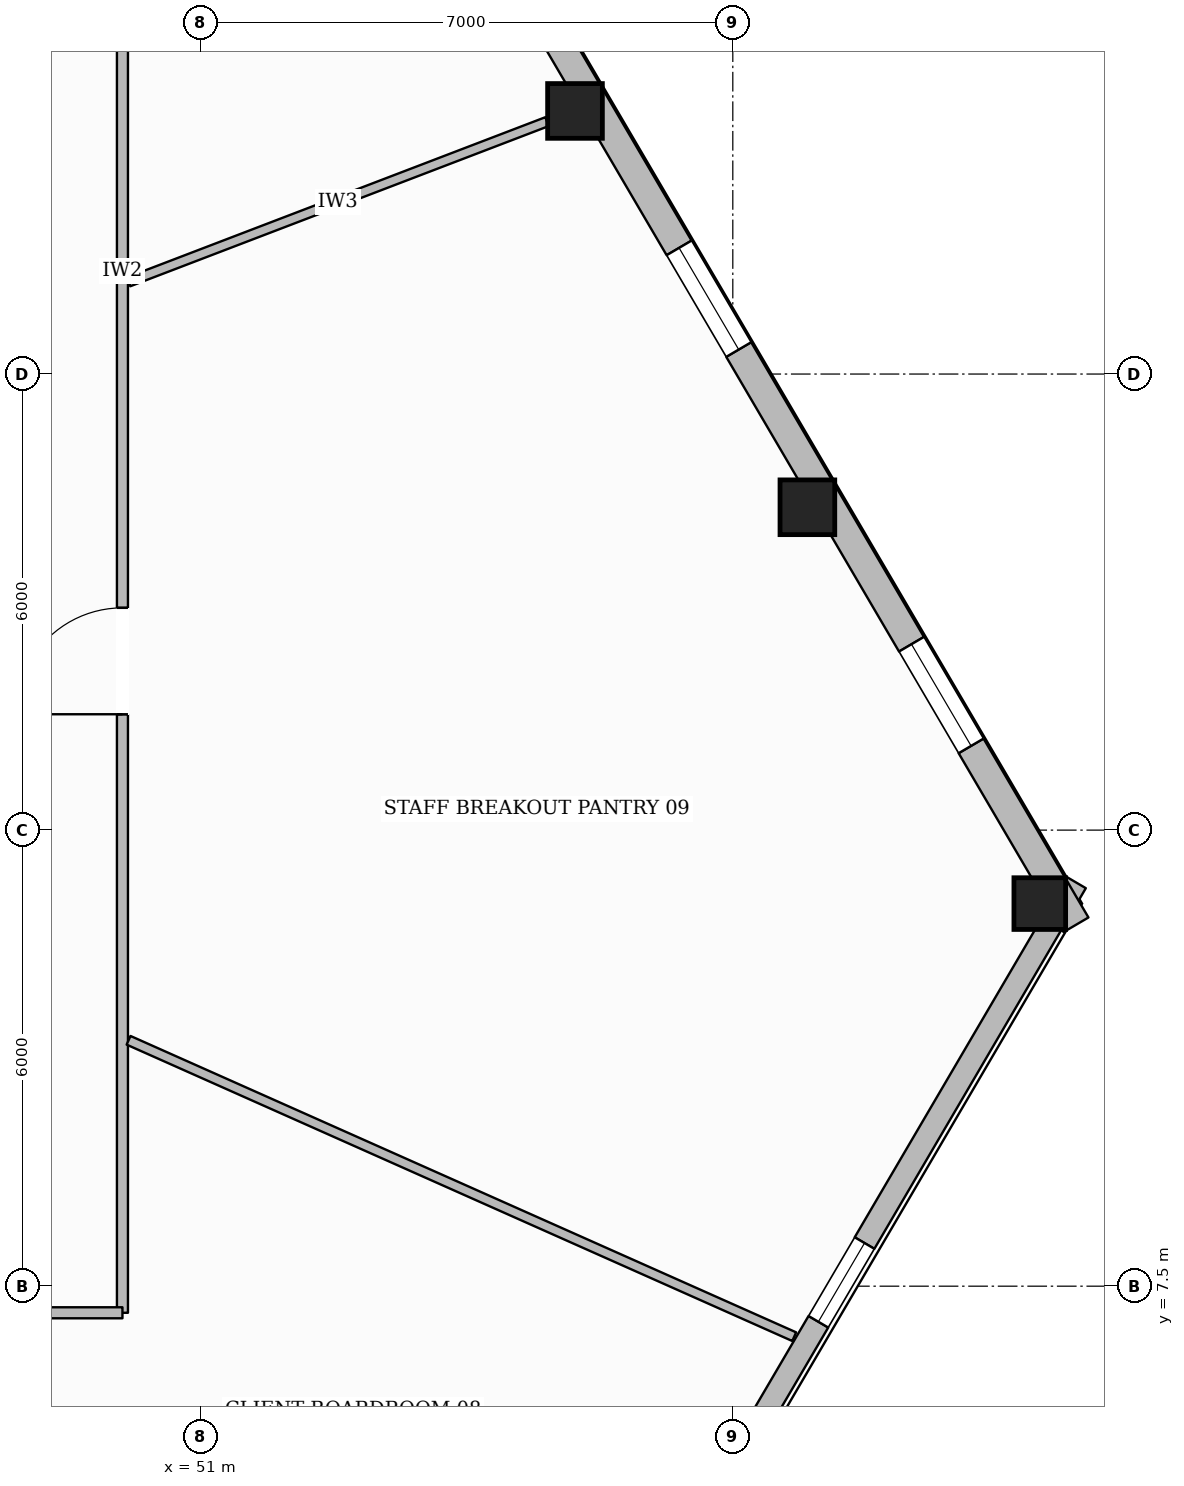
"""IFC4 building model, lengths in metres.
Left out: names, types, materials, properties, quantities, classifications, styles, units other than length and angle.
Written with IfcOpenShell. Run it as: python <this file> out.ifc"""

import sys

from ifc_helpers import new_model, si_unit, direction, frame, frame_2d, origin, origin_2d, place, context, subcontext, project, spatial, rectangle, hollow_rectangle, extrude, element, fill, save


model = new_model("IFC4")
c1 = context("Model", 3, precision=1e-05, world=origin(), true_north=direction((0.0, 1.0)))
c2 = subcontext(c1, "Body", "Model", "MODEL_VIEW")
j1 = project(units=[si_unit("LENGTHUNIT", "METRE"), si_unit("PLANEANGLEUNIT", "RADIAN")], contexts=[c1])
p1 = place(None, origin())
s1 = spatial("IfcSite", under=j1, at=p1, CompositionType="ELEMENT")
p2 = place(p1, origin())
s2 = spatial("IfcBuilding", under=s1, at=p2, CompositionType="ELEMENT")
p3 = place(p2, frame((0.0, 0.0, 131.7)))
s3 = spatial("IfcBuildingStorey", under=s2, at=p3, CompositionType="ELEMENT", Elevation=131.7)
p4 = place(p3, frame((62.039, 12.533, 0.0), z_axis=(0.0, 0.0, 1.0), x_axis=(1.0, 0.0, 0.0)))
e1 = element("IfcColumn", 1, at=p4, inside=s3, PredefinedType="COLUMN", context=c2, shape_type="SweptSolid", body=[
    extrude(hollow_rectangle(XDim=0.68, YDim=0.68, WallThickness=0.03, at=origin_2d()), origin(), (0.0, 0.0, 1.0), 3.6),
])
for number, where, z_axis, x_axis in (
    (2, (58.981, 17.747, 0.0), (0.0, 0.0, 1.0), (1.0, 0.0, 0.0)),
    (3, (55.924, 22.961, 0.0), (0.0, 0.0, 1.0), (1.0, 0.0, 0.0)),
):
    element("IfcColumn", number, at=place(p3, frame(where, z_axis=z_axis, x_axis=x_axis)), inside=s3, PredefinedType="COLUMN", context=c2, shape_type="SweptSolid", body=[
        extrude(hollow_rectangle(XDim=0.72, YDim=0.72, WallThickness=0.032, at=origin_2d()), origin(), (0.0, 0.0, 1.0), 3.6),
    ])
p5 = place(p3, frame((62.515, 12.812, 0.0), z_axis=(0.0, 0.0, 1.0), x_axis=(-0.505835558362, -0.862629925227, 0.0)))
e4 = element("IfcWall", 4, at=p5, inside=s3, PredefinedType="STANDARD", context=c2, shape_type="SweptSolid", body=[
    extrude(rectangle(XDim=12.2, YDim=0.3, at=frame_2d((6.1, 0.0))), origin(), (0.0, 0.0, 1.0), 3.059),
])
p6 = place(p5, frame((5.5, 0.0, 0.65)))
e5 = element("IfcOpeningElement", 5, at=p6, cuts=e4, PredefinedType="OPENING", context=c2, shape_type="SweptSolid", body=[
    extrude(rectangle(XDim=1.2, YDim=1.7, at=frame_2d((0.6, 0.85))), frame((0.0, 0.16, 0.0), z_axis=(0.0, -1.0, 0.0), x_axis=(1.0, 0.0, 0.0)), (0.0, 0.0, 1.0), 0.32),
])
p7 = place(p3, frame((43.687, 44.364, 0.0), z_axis=(0.0, 0.0, 1.0), x_axis=(0.505829244079, -0.862633627813, 0.0)))
e6 = element("IfcWall", 6, at=p7, inside=s3, PredefinedType="STANDARD", context=c2, shape_type="SweptSolid", body=[
    extrude(rectangle(XDim=37.223, YDim=0.38, at=frame_2d((18.611, 0.0))), origin(), (0.0, 0.0, 1.0), 3.059),
])
p8 = place(p7, frame((32.944, 0.0, 0.65)))
e7 = element("IfcOpeningElement", 7, at=p8, cuts=e6, PredefinedType="OPENING", context=c2, shape_type="SweptSolid", body=[
    extrude(rectangle(XDim=1.55, YDim=1.75, at=frame_2d((0.775, 0.875))), frame((0.0, 0.2, 0.0), z_axis=(0.0, -1.0, 0.0), x_axis=(1.0, 0.0, 0.0)), (0.0, 0.0, 1.0), 0.4),
])
p9 = place(p7, frame((26.9, 0.0, 0.65)))
e8 = element("IfcOpeningElement", 8, at=p9, cuts=e6, PredefinedType="OPENING", context=c2, shape_type="SweptSolid", body=[
    extrude(rectangle(XDim=1.55, YDim=1.75, at=frame_2d((0.775, 0.875))), frame((0.0, 0.2, 0.0), z_axis=(0.0, -1.0, 0.0), x_axis=(1.0, 0.0, 0.0)), (0.0, 0.0, 1.0), 0.4),
])
p10 = place(p7, frame((14.811, 0.0, 0.65)))
e9 = element("IfcOpeningElement", 9, at=p10, cuts=e6, PredefinedType="OPENING", context=c2, shape_type="SweptSolid", body=[
    extrude(rectangle(XDim=1.55, YDim=1.75, at=frame_2d((0.775, 0.875))), frame((0.0, 0.2, 0.0), z_axis=(0.0, -1.0, 0.0), x_axis=(1.0, 0.0, 0.0)), (0.0, 0.0, 1.0), 0.4),
])
p11 = place(p7, frame((8.767, 0.0, 0.65)))
e10 = element("IfcOpeningElement", 10, at=p11, cuts=e6, PredefinedType="OPENING", context=c2, shape_type="SweptSolid", body=[
    extrude(rectangle(XDim=1.55, YDim=1.75, at=frame_2d((0.775, 0.875))), frame((0.0, 0.2, 0.0), z_axis=(0.0, -1.0, 0.0), x_axis=(1.0, 0.0, 0.0)), (0.0, 0.0, 1.0), 0.4),
])
p12 = place(p7, frame((2.722, 0.0, 0.65)))
e11 = element("IfcOpeningElement", 11, at=p12, cuts=e6, PredefinedType="OPENING", context=c2, shape_type="SweptSolid", body=[
    extrude(rectangle(XDim=1.55, YDim=1.75, at=frame_2d((0.775, 0.875))), frame((0.0, 0.2, 0.0), z_axis=(0.0, -1.0, 0.0), x_axis=(1.0, 0.0, 0.0)), (0.0, 0.0, 1.0), 0.4),
])
p13 = place(p3, frame((49.97, 7.15, 0.0), z_axis=(0.0, 0.0, 1.0), x_axis=(0.0, 1.0, 0.0)))
e12 = element("IfcWall", 12, at=p13, inside=s3, PredefinedType="PARTITIONING", context=c2, shape_type="SweptSolid", body=[
    extrude(rectangle(XDim=17.9, YDim=0.145, at=frame_2d((8.95, 0.0))), origin(), (0.0, 0.0, 1.0), 3.288),
])
p14 = place(p13, frame((7.874, 0.0, 0.0)))
e13 = element("IfcOpeningElement", 13, at=p14, cuts=e12, PredefinedType="OPENING", context=c2, shape_type="SweptSolid", body=[
    extrude(rectangle(XDim=1.4, YDim=2.2, at=frame_2d((0.7, 1.1))), frame((0.0, 0.083, 0.0), z_axis=(0.0, -1.0, 0.0), x_axis=(1.0, 0.0, 0.0)), (0.0, 0.0, 1.0), 0.165),
])
p15 = place(p3, frame((26.03, 7.15, 0.0), z_axis=(0.0, 0.0, 1.0), x_axis=(1.0, 0.0, 0.0)))
e14 = element("IfcWall", 14, at=p15, inside=s3, PredefinedType="PARTITIONING", context=c2, shape_type="SweptSolid", body=[
    extrude(rectangle(XDim=23.94, YDim=0.145, at=frame_2d((11.97, 0.0))), origin(), (0.0, 0.0, 1.0), 3.6),
])
p16 = place(p15, frame((7.452, 0.0, 0.0)))
e15 = element("IfcOpeningElement", 15, at=p16, cuts=e14, PredefinedType="OPENING", context=c2, shape_type="SweptSolid", body=[
    extrude(rectangle(XDim=1.4, YDim=2.2, at=frame_2d((0.7, 1.1))), frame((0.0, 0.083, 0.0), z_axis=(0.0, -1.0, 0.0), x_axis=(1.0, 0.0, 0.0)), (0.0, 0.0, 1.0), 0.165),
])
p17 = place(p15, frame((19.642, 0.0, 0.0)))
e16 = element("IfcOpeningElement", 16, at=p17, cuts=e14, PredefinedType="OPENING", context=c2, shape_type="SweptSolid", body=[
    extrude(rectangle(XDim=1.02, YDim=2.15, at=frame_2d((0.51, 1.075))), frame((0.0, 0.083, 0.0), z_axis=(0.0, -1.0, 0.0), x_axis=(1.0, 0.0, 0.0)), (0.0, 0.0, 1.0), 0.165),
])
p18 = place(p3, frame((50.051, 20.713, 0.0), z_axis=(0.0, 0.0, 1.0), x_axis=(0.933900595494, 0.357532764563, 0.0)))
e17 = element("IfcWall", 17, at=p18, inside=s3, PredefinedType="PARTITIONING", context=c2, shape_type="SweptSolid", body=[
    extrude(rectangle(XDim=5.895, YDim=0.125, at=frame_2d((2.948, 0.0))), origin(), (0.0, 0.0, 1.0), 3.6),
])
p19 = place(p3, frame((50.051, 10.735, 0.0), z_axis=(0.0, 0.0, 1.0), x_axis=(0.913539334281, -0.406750396092, 0.0)))
e18 = element("IfcWall", 18, at=p19, inside=s3, PredefinedType="PARTITIONING", context=c2, shape_type="SweptSolid", body=[
    extrude(rectangle(XDim=9.586, YDim=0.125, at=frame_2d((4.793, 0.0))), origin(), (0.0, 0.0, 1.0), 3.6),
])
p20 = place(p8, origin())
e19 = element("IfcWindow", 19, at=p20, inside=s3, PartitioningType="SINGLE_PANEL", PredefinedType="WINDOW", context=c2, shape_type="SweptSolid", body=[
    extrude(rectangle(XDim=1.55, YDim=1.75, at=frame_2d((0.775, 0.875))), frame((0.0, 0.03, 0.0), z_axis=(0.0, -1.0, 0.0), x_axis=(1.0, 0.0, 0.0)), (0.0, 0.0, 1.0), 0.06),
])
fill(e7, e19)
p21 = place(p9, origin())
e20 = element("IfcWindow", 20, at=p21, inside=s3, PartitioningType="SINGLE_PANEL", PredefinedType="WINDOW", context=c2, shape_type="SweptSolid", body=[
    extrude(rectangle(XDim=1.55, YDim=1.75, at=frame_2d((0.775, 0.875))), frame((0.0, 0.03, 0.0), z_axis=(0.0, -1.0, 0.0), x_axis=(1.0, 0.0, 0.0)), (0.0, 0.0, 1.0), 0.06),
])
fill(e8, e20)
p22 = place(p6, origin())
e21 = element("IfcWindow", 21, at=p22, inside=s3, PartitioningType="SINGLE_PANEL", PredefinedType="WINDOW", context=c2, shape_type="SweptSolid", body=[
    extrude(rectangle(XDim=1.2, YDim=1.7, at=frame_2d((0.6, 0.85))), frame((0.0, 0.03, 0.0), z_axis=(0.0, -1.0, 0.0), x_axis=(1.0, 0.0, 0.0)), (0.0, 0.0, 1.0), 0.06),
])
fill(e5, e21)
p23 = place(p14, origin())
e22 = element("IfcDoor", 22, at=p23, inside=s3, OperationType="SINGLE_SWING_LEFT", PredefinedType="DOOR", context=c2, shape_type="SweptSolid", body=[
    extrude(rectangle(XDim=1.4, YDim=2.2, at=frame_2d((0.7, 1.1))), frame((0.0, 0.025, 0.0), z_axis=(0.0, -1.0, 0.0), x_axis=(1.0, 0.0, 0.0)), (0.0, 0.0, 1.0), 0.05),
])
fill(e13, e22)
save(model, sys.argv[1])
